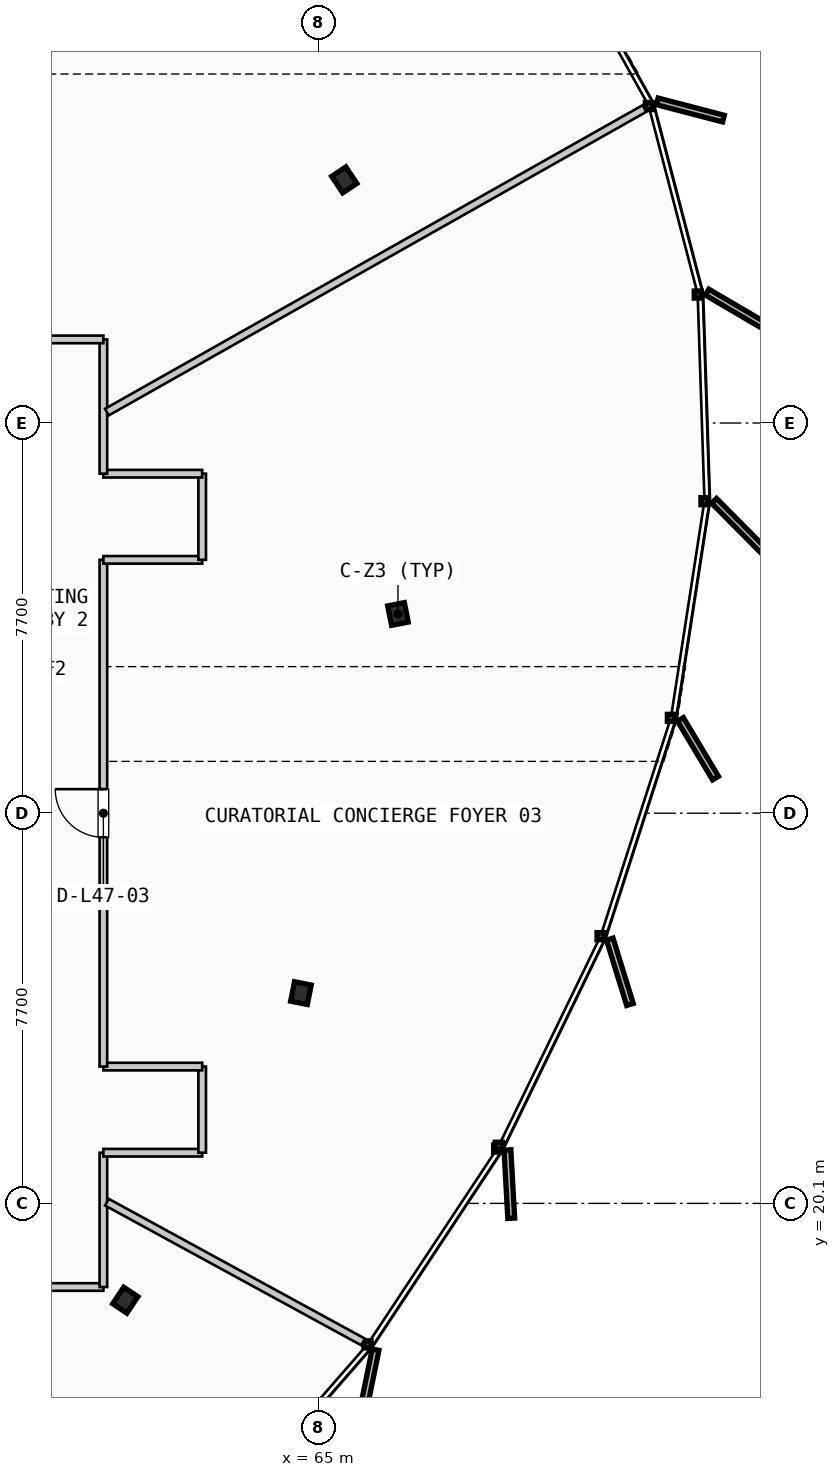
"""IFC4 building model, lengths in metres.
Left out: names, types, materials, properties, quantities, classifications, styles, units other than length and angle.
Written with IfcOpenShell. Run it as: python <this file> out.ifc"""

import sys

from ifc_helpers import new_model, si_unit, direction, frame, frame_2d, origin, origin_2d, place, context, subcontext, project, spatial, rectangle, i_section, extrude, source, transform, mapped, element, fill, save


model = new_model("IFC4")
c1 = context("Model", 3, precision=1e-05, world=origin(), true_north=direction((0.0, 1.0)))
c2 = subcontext(c1, "Body", "Model", "MODEL_VIEW")
j1 = project(units=[si_unit("LENGTHUNIT", "METRE"), si_unit("PLANEANGLEUNIT", "RADIAN")], contexts=[c1])
p1 = place(None, origin())
s1 = spatial("IfcSite", under=j1, at=p1, CompositionType="ELEMENT")
p2 = place(p1, origin())
s2 = spatial("IfcBuilding", under=s1, at=p2, CompositionType="ELEMENT")
p3 = place(p2, frame((0.0, 0.0, 183.4)))
s3 = spatial("IfcBuildingStorey", under=s2, at=p3, CompositionType="ELEMENT", Elevation=183.4)
m1 = source(origin(), c2, "Body", "SweptSolid", [
    extrude(i_section(OverallWidth=0.391, OverallDepth=0.335, WebThickness=0.023, FlangeThickness=0.034, FilletRadius=0.015, at=origin_2d()), origin(), (0.0, 0.0, 1.0), 3.26),
])
for number, where, z_axis, x_axis in (
    (1, (66.564, 31.731, 0.0), (0.0, 0.0, 1.0), (0.981, 0.195, 0.0)),
    (2, (65.504, 40.298, 0.0), (0.0, 0.0, 1.0), (0.831, 0.556, 0.0)),
    (3, (61.183, 18.19, 0.0), (0.0, 0.0, 1.0), (0.831, -0.556, 0.0)),
    (4, (64.649, 24.25, 0.0), (0.0, 0.0, 1.0), (0.981, -0.195, 0.0)),
):
    element("IfcColumn", number, at=place(p3, frame(where, z_axis=z_axis, x_axis=x_axis)), inside=s3, PredefinedType="COLUMN", context=c2, shape_type="MappedRepresentation", body=[
        mapped(m1, transform((0.0, 0.0, 0.0), scale=1.0)),
    ])
p4 = place(p3, frame((32.4, 18.45, 0.0), z_axis=(0.0, 0.0, 1.0), x_axis=(1.0, 0.0, 0.0)))
e5 = element("IfcWall", 5, at=p4, inside=s3, PredefinedType="PARTITIONING", context=c2, shape_type="SweptSolid", body=[
    extrude(rectangle(XDim=28.35, YDim=0.15, at=frame_2d((14.175, 0.0))), origin(), (0.0, 0.0, 1.0), 2.28),
])
p5 = place(p4, frame((5.444, 0.0, 0.0)))
e6 = element("IfcOpeningElement", 6, at=p5, cuts=e5, PredefinedType="OPENING", context=c2, shape_type="SweptSolid", body=[
    extrude(rectangle(XDim=0.95, YDim=2.15, at=frame_2d((0.475, 1.075))), frame((0.0, 0.085, 0.0), z_axis=(0.0, -1.0, 0.0), x_axis=(1.0, 0.0, 0.0)), (0.0, 0.0, 1.0), 0.17),
])
p6 = place(p4, frame((19.031, 0.0, 0.0)))
e7 = element("IfcOpeningElement", 7, at=p6, cuts=e5, PredefinedType="OPENING", context=c2, shape_type="SweptSolid", body=[
    extrude(rectangle(XDim=0.95, YDim=2.15, at=frame_2d((0.475, 1.075))), frame((0.0, 0.085, 0.0), z_axis=(0.0, -1.0, 0.0), x_axis=(1.0, 0.0, 0.0)), (0.0, 0.0, 1.0), 0.17),
])
p7 = place(p3, frame((60.75, 18.45, 0.0), z_axis=(0.0, 0.0, 1.0), x_axis=(0.0, 1.0, 0.0)))
e8 = element("IfcWall", 8, at=p7, inside=s3, PredefinedType="PARTITIONING", context=c2, shape_type="SweptSolid", body=[
    extrude(rectangle(XDim=2.65, YDim=0.15, at=frame_2d((1.325, 0.0))), origin(), (0.0, 0.0, 1.0), 2.28),
])
p8 = place(p3, frame((60.75, 21.1, 0.0), z_axis=(0.0, 0.0, 1.0), x_axis=(1.0, 0.0, 0.0)))
e9 = element("IfcWall", 9, at=p8, inside=s3, PredefinedType="PARTITIONING", context=c2, shape_type="SweptSolid", body=[
    extrude(rectangle(XDim=1.95, YDim=0.15, at=frame_2d((0.975, 0.0))), origin(), (0.0, 0.0, 1.0), 2.28),
])
p9 = place(p3, frame((62.7, 21.1, 0.0), z_axis=(0.0, 0.0, 1.0), x_axis=(0.0, 1.0, 0.0)))
e10 = element("IfcWall", 10, at=p9, inside=s3, PredefinedType="PARTITIONING", context=c2, shape_type="SweptSolid", body=[
    extrude(rectangle(XDim=1.7, YDim=0.15, at=frame_2d((0.85, 0.0))), origin(), (0.0, 0.0, 1.0), 2.28),
])
p10 = place(p3, frame((62.7, 22.8, 0.0), z_axis=(0.0, 0.0, 1.0), x_axis=(-1.0, 0.0, 0.0)))
e11 = element("IfcWall", 11, at=p10, inside=s3, PredefinedType="PARTITIONING", context=c2, shape_type="SweptSolid", body=[
    extrude(rectangle(XDim=1.95, YDim=0.15, at=frame_2d((0.975, 0.0))), origin(), (0.0, 0.0, 1.0), 2.28),
])
p11 = place(p3, frame((60.75, 22.8, 0.0), z_axis=(0.0, 0.0, 1.0), x_axis=(0.0, 1.0, 0.0)))
e12 = element("IfcWall", 12, at=p11, inside=s3, PredefinedType="PARTITIONING", context=c2, shape_type="SweptSolid", body=[
    extrude(rectangle(XDim=10.0, YDim=0.15, at=frame_2d((5.0, 0.0))), origin(), (0.0, 0.0, 1.0), 2.28),
])
p12 = place(p11, frame((4.525, 0.0, 0.0)))
e13 = element("IfcOpeningElement", 13, at=p12, cuts=e12, PredefinedType="OPENING", context=c2, shape_type="SweptSolid", body=[
    extrude(rectangle(XDim=0.95, YDim=2.15, at=frame_2d((0.475, 1.075))), frame((0.0, 0.085, 0.0), z_axis=(0.0, -1.0, 0.0), x_axis=(1.0, 0.0, 0.0)), (0.0, 0.0, 1.0), 0.17),
])
p13 = place(p3, frame((60.75, 32.8, 0.0), z_axis=(0.0, 0.0, 1.0), x_axis=(1.0, 0.0, 0.0)))
e14 = element("IfcWall", 14, at=p13, inside=s3, PredefinedType="PARTITIONING", context=c2, shape_type="SweptSolid", body=[
    extrude(rectangle(XDim=1.95, YDim=0.15, at=frame_2d((0.975, 0.0))), origin(), (0.0, 0.0, 1.0), 2.28),
])
p14 = place(p3, frame((62.7, 32.8, 0.0), z_axis=(0.0, 0.0, 1.0), x_axis=(0.0, 1.0, 0.0)))
e15 = element("IfcWall", 15, at=p14, inside=s3, PredefinedType="PARTITIONING", context=c2, shape_type="SweptSolid", body=[
    extrude(rectangle(XDim=1.7, YDim=0.15, at=frame_2d((0.85, 0.0))), origin(), (0.0, 0.0, 1.0), 2.28),
])
p15 = place(p3, frame((62.7, 34.5, 0.0), z_axis=(0.0, 0.0, 1.0), x_axis=(-1.0, 0.0, 0.0)))
e16 = element("IfcWall", 16, at=p15, inside=s3, PredefinedType="PARTITIONING", context=c2, shape_type="SweptSolid", body=[
    extrude(rectangle(XDim=1.95, YDim=0.15, at=frame_2d((0.975, 0.0))), origin(), (0.0, 0.0, 1.0), 2.28),
])
p16 = place(p3, frame((60.75, 34.5, 0.0), z_axis=(0.0, 0.0, 1.0), x_axis=(0.0, 1.0, 0.0)))
e17 = element("IfcWall", 17, at=p16, inside=s3, PredefinedType="PARTITIONING", context=c2, shape_type="SweptSolid", body=[
    extrude(rectangle(XDim=2.65, YDim=0.15, at=frame_2d((1.325, 0.0))), origin(), (0.0, 0.0, 1.0), 2.28),
])
p17 = place(p3, frame((60.75, 37.15, 0.0), z_axis=(0.0, 0.0, 1.0), x_axis=(-1.0, 0.0, 0.0)))
e18 = element("IfcWall", 18, at=p17, inside=s3, PredefinedType="PARTITIONING", context=c2, shape_type="SweptSolid", body=[
    extrude(rectangle(XDim=28.35, YDim=0.15, at=frame_2d((14.175, 0.0))), origin(), (0.0, 0.0, 1.0), 2.28),
])
p18 = place(p17, frame((13.7, 0.0, 0.0)))
e19 = element("IfcOpeningElement", 19, at=p18, cuts=e18, PredefinedType="OPENING", context=c2, shape_type="SweptSolid", body=[
    extrude(rectangle(XDim=0.95, YDim=2.15, at=frame_2d((0.475, 1.075))), frame((0.0, 0.085, 0.0), z_axis=(0.0, -1.0, 0.0), x_axis=(1.0, 0.0, 0.0)), (0.0, 0.0, 1.0), 0.17),
])
p19 = place(p3, frame((60.82, 20.124, 0.0), z_axis=(0.0, 0.0, 1.0), x_axis=(0.87786316589, -0.478911538776, 0.0)))
e20 = element("IfcWall", 20, at=p19, inside=s3, PredefinedType="PARTITIONING", context=c2, shape_type="SweptSolid", body=[
    extrude(rectangle(XDim=5.759, YDim=0.15, at=frame_2d((2.879, 0.0))), origin(), (0.0, 0.0, 1.0), 2.28),
])
p20 = place(p3, frame((60.82, 35.716, 0.0), z_axis=(0.0, 0.0, 1.0), x_axis=(0.870759825279, 0.491708579019, 0.0)))
e21 = element("IfcWall", 21, at=p20, inside=s3, PredefinedType="PARTITIONING", context=c2, shape_type="SweptSolid", body=[
    extrude(rectangle(XDim=12.184, YDim=0.15, at=frame_2d((6.092, 0.0))), origin(), (0.0, 0.0, 1.0), 2.28),
])
m2 = source(origin(), c2, "Body", "SweptSolid", [
    extrude(rectangle(XDim=0.95, YDim=2.15, at=frame_2d((0.475, 1.075))), frame((0.0, 0.025, 0.0), z_axis=(0.0, -1.0, 0.0), x_axis=(1.0, 0.0, 0.0)), (0.0, 0.0, 1.0), 0.05),
])
p21 = place(p12, origin())
e22 = element("IfcDoor", 22, at=p21, inside=s3, OperationType="SINGLE_SWING_RIGHT", PredefinedType="DOOR", context=c2, shape_type="MappedRepresentation", body=[
    mapped(m2, transform((0.0, 0.0, 0.0), scale=1.0)),
])
fill(e13, e22)
save(model, sys.argv[1])
